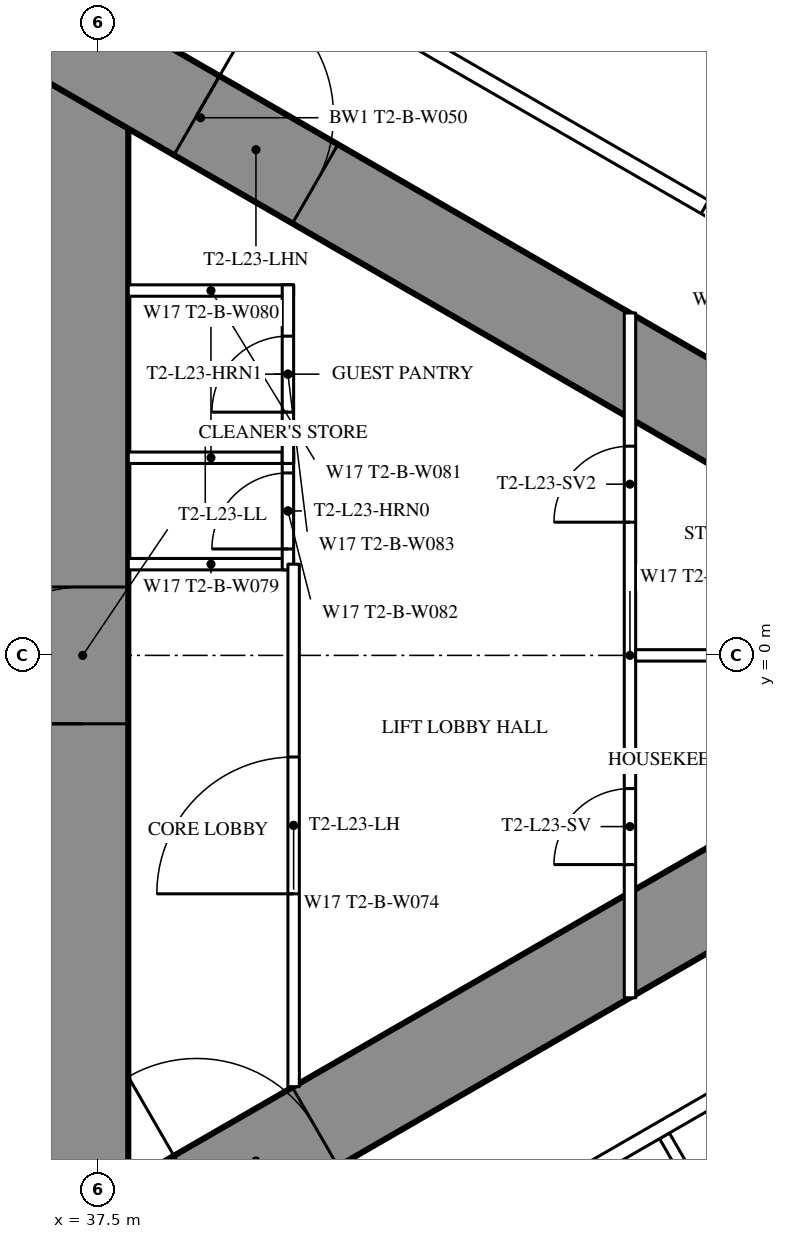
"""IFC4 building model, lengths in metres.
Left out: names, types, materials, properties, quantities, classifications, styles, units other than length and angle.
Written with IfcOpenShell. Run it as: python <this file> out.ifc"""

import sys

from ifc_helpers import new_model, si_unit, direction, frame, frame_2d, origin, place, context, subcontext, project, spatial, rectangle, extrude, element, fill, save


model = new_model("IFC4")
c1 = context("Model", 3, precision=1e-05, world=origin(), true_north=direction((0.0, 1.0)))
c2 = subcontext(c1, "Body", "Model", "MODEL_VIEW")
j1 = project(units=[si_unit("LENGTHUNIT", "METRE"), si_unit("PLANEANGLEUNIT", "RADIAN")], contexts=[c1])
p1 = place(None, origin())
s1 = spatial("IfcSite", under=j1, at=p1, CompositionType="ELEMENT")
p2 = place(p1, origin())
s2 = spatial("IfcBuilding", under=s1, at=p2, CompositionType="ELEMENT")
p3 = place(p2, frame((0.0, 0.0, 90.6)))
s3 = spatial("IfcBuildingStorey", under=s2, at=p3, CompositionType="ELEMENT", Elevation=90.6)
p4 = place(p3, frame((37.3, -8.6, 0.0), z_axis=(0.0, 0.0, 1.0), x_axis=(0.0, 1.0, 0.0)))
e1 = element("IfcWall", 1, at=p4, inside=s3, PredefinedType="SHEAR", context=c2, shape_type="SweptSolid", body=[
    extrude(rectangle(XDim=17.2, YDim=1.2, at=frame_2d((8.6, 0.0))), origin(), (0.0, 0.0, 1.0), 3.5),
])
p5 = place(p4, frame((7.7, 0.0, 0.0)))
e2 = element("IfcOpeningElement", 2, at=p5, cuts=e1, PredefinedType="OPENING", context=c2, shape_type="SweptSolid", body=[
    extrude(rectangle(XDim=1.8, YDim=2.2, at=frame_2d((0.9, 1.1))), frame((0.0, 0.61, 0.0), z_axis=(0.0, -1.0, 0.0), x_axis=(1.0, 0.0, 0.0)), (0.0, 0.0, 1.0), 1.22),
])
p6 = place(p3, frame((27.2, -13.8, 0.0), z_axis=(0.0, 0.0, 1.0), x_axis=(0.866027159892, 0.499996958321, 0.0)))
e3 = element("IfcWall", 3, at=p6, inside=s3, PredefinedType="SHEAR", context=c2, shape_type="SweptSolid", body=[
    extrude(rectangle(XDim=27.947, YDim=1.2, at=frame_2d((13.973, 0.0))), origin(), (0.0, 0.0, 1.0), 3.5),
])
p7 = place(p6, frame((4.6, 0.0, 0.0)))
e4 = element("IfcOpeningElement", 4, at=p7, cuts=e3, PredefinedType="OPENING", context=c2, shape_type="SweptSolid", body=[
    extrude(rectangle(XDim=1.0, YDim=2.2, at=frame_2d((0.5, 1.1))), frame((0.0, 0.61, 0.0), z_axis=(0.0, -1.0, 0.0), x_axis=(1.0, 0.0, 0.0)), (0.0, 0.0, 1.0), 1.22),
])
p8 = place(p6, frame((13.395, 0.0, 0.0)))
e5 = element("IfcOpeningElement", 5, at=p8, cuts=e3, PredefinedType="OPENING", context=c2, shape_type="SweptSolid", body=[
    extrude(rectangle(XDim=1.8, YDim=2.2, at=frame_2d((0.9, 1.1))), frame((0.0, 0.61, 0.0), z_axis=(0.0, -1.0, 0.0), x_axis=(1.0, 0.0, 0.0)), (0.0, 0.0, 1.0), 1.22),
])
p9 = place(p3, frame((27.2, 13.8, 0.0), z_axis=(0.0, 0.0, 1.0), x_axis=(0.866024515034, -0.500001539357, 0.0)))
e6 = element("IfcWall", 6, at=p9, inside=s3, PredefinedType="SHEAR", context=c2, shape_type="SweptSolid", body=[
    extrude(rectangle(XDim=26.907, YDim=1.2, at=frame_2d((13.454, 0.0))), origin(), (0.0, 0.0, 1.0), 3.5),
])
p10 = place(p9, frame((4.6, 0.0, 0.0)))
e7 = element("IfcOpeningElement", 7, at=p10, cuts=e6, PredefinedType="OPENING", context=c2, shape_type="SweptSolid", body=[
    extrude(rectangle(XDim=1.0, YDim=2.2, at=frame_2d((0.5, 1.1))), frame((0.0, 0.61, 0.0), z_axis=(0.0, -1.0, 0.0), x_axis=(1.0, 0.0, 0.0)), (0.0, 0.0, 1.0), 1.22),
])
p11 = place(p9, frame((13.395, 0.0, 0.0)))
e8 = element("IfcOpeningElement", 8, at=p11, cuts=e6, PredefinedType="OPENING", context=c2, shape_type="SweptSolid", body=[
    extrude(rectangle(XDim=1.8, YDim=2.2, at=frame_2d((0.9, 1.1))), frame((0.0, 0.61, 0.0), z_axis=(0.0, -1.0, 0.0), x_axis=(1.0, 0.0, 0.0)), (0.0, 0.0, 1.0), 1.22),
])
p12 = place(p3, frame((44.954, -6.321, 0.0), z_axis=(0.0, 0.0, 1.0), x_axis=(0.500018676722, -0.866014620505, 0.0)))
e9 = element("IfcWall", 9, at=p12, inside=s3, PredefinedType="PARTITIONING", context=c2, shape_type="SweptSolid", body=[
    extrude(rectangle(XDim=8.704, YDim=0.15, at=frame_2d((4.352, 0.0))), origin(), (0.0, 0.0, 1.0), 2.2),
])
p13 = place(p3, frame((37.96, -10.243, 0.0), z_axis=(0.0, 0.0, 1.0), x_axis=(0.866026429433, 0.499998223521, 0.0)))
e10 = element("IfcWall", 10, at=p13, inside=s3, PredefinedType="PARTITIONING", context=c2, shape_type="SweptSolid", body=[
    extrude(rectangle(XDim=20.487, YDim=0.2, at=frame_2d((10.243, 0.0))), origin(), (0.0, 0.0, 1.0), 3.25),
])
p14 = place(p13, frame((4.047, 0.0, 0.0)))
e11 = element("IfcOpeningElement", 11, at=p14, cuts=e10, PredefinedType="OPENING", context=c2, shape_type="SweptSolid", body=[
    extrude(rectangle(XDim=0.95, YDim=2.2, at=frame_2d((0.475, 1.1))), frame((0.0, 0.11, 0.0), z_axis=(0.0, -1.0, 0.0), x_axis=(1.0, 0.0, 0.0)), (0.0, 0.0, 1.0), 0.22),
])
p15 = place(p13, frame((11.04, 0.0, 0.0)))
e12 = element("IfcOpeningElement", 12, at=p15, cuts=e10, PredefinedType="OPENING", context=c2, shape_type="SweptSolid", body=[
    extrude(rectangle(XDim=0.95, YDim=2.2, at=frame_2d((0.475, 1.1))), frame((0.0, 0.11, 0.0), z_axis=(0.0, -1.0, 0.0), x_axis=(1.0, 0.0, 0.0)), (0.0, 0.0, 1.0), 0.22),
])
p16 = place(p13, frame((13.035, 0.0, 0.0)))
e13 = element("IfcOpeningElement", 13, at=p16, cuts=e10, PredefinedType="OPENING", context=c2, shape_type="SweptSolid", body=[
    extrude(rectangle(XDim=0.95, YDim=2.2, at=frame_2d((0.475, 1.1))), frame((0.0, 0.11, 0.0), z_axis=(0.0, -1.0, 0.0), x_axis=(1.0, 0.0, 0.0)), (0.0, 0.0, 1.0), 0.22),
])
p17 = place(p13, frame((17.085, 0.0, 0.0)))
e14 = element("IfcOpeningElement", 14, at=p17, cuts=e10, PredefinedType="OPENING", context=c2, shape_type="SweptSolid", body=[
    extrude(rectangle(XDim=0.95, YDim=2.2, at=frame_2d((0.475, 1.1))), frame((0.0, 0.11, 0.0), z_axis=(0.0, -1.0, 0.0), x_axis=(1.0, 0.0, 0.0)), (0.0, 0.0, 1.0), 0.22),
])
p18 = place(p13, frame((1.048, 0.0, 0.0)))
e15 = element("IfcOpeningElement", 15, at=p18, cuts=e10, PredefinedType="OPENING", context=c2, shape_type="SweptSolid", body=[
    extrude(rectangle(XDim=1.8, YDim=2.2, at=frame_2d((0.9, 1.1))), frame((0.0, 0.11, 0.0), z_axis=(0.0, -1.0, 0.0), x_axis=(1.0, 0.0, 0.0)), (0.0, 0.0, 1.0), 0.22),
])
p19 = place(p3, frame((36.834, 10.894, 0.0), z_axis=(0.0, 0.0, 1.0), x_axis=(0.866028157229, -0.499995230863, 0.0)))
e16 = element("IfcWall", 16, at=p19, inside=s3, PredefinedType="PARTITIONING", context=c2, shape_type="SweptSolid", body=[
    extrude(rectangle(XDim=21.667, YDim=0.2, at=frame_2d((10.833, 0.0))), origin(), (0.0, 0.0, 1.0), 3.25),
])
p20 = place(p19, frame((14.04, 0.0, 0.0)))
e17 = element("IfcOpeningElement", 17, at=p20, cuts=e16, PredefinedType="OPENING", context=c2, shape_type="SweptSolid", body=[
    extrude(rectangle(XDim=0.95, YDim=2.2, at=frame_2d((0.475, 1.1))), frame((0.0, 0.11, 0.0), z_axis=(0.0, -1.0, 0.0), x_axis=(1.0, 0.0, 0.0)), (0.0, 0.0, 1.0), 0.22),
])
p21 = place(p19, frame((9.99, 0.0, 0.0)))
e18 = element("IfcOpeningElement", 18, at=p21, cuts=e16, PredefinedType="OPENING", context=c2, shape_type="SweptSolid", body=[
    extrude(rectangle(XDim=0.95, YDim=2.2, at=frame_2d((0.475, 1.1))), frame((0.0, 0.11, 0.0), z_axis=(0.0, -1.0, 0.0), x_axis=(1.0, 0.0, 0.0)), (0.0, 0.0, 1.0), 0.22),
])
p22 = place(p19, frame((3.35, 0.0, 0.0)))
e19 = element("IfcOpeningElement", 19, at=p22, cuts=e16, PredefinedType="OPENING", context=c2, shape_type="SweptSolid", body=[
    extrude(rectangle(XDim=1.0, YDim=2.2, at=frame_2d((0.5, 1.1))), frame((0.0, 0.11, 0.0), z_axis=(0.0, -1.0, 0.0), x_axis=(1.0, 0.0, 0.0)), (0.0, 0.0, 1.0), 0.22),
])
for number, where, z_axis, x_axis in (
    (20, (37.9, 1.2, 0.0), (0.0, 0.0, 1.0), (1.0, 0.0, 0.0)),
    (21, (37.9, 2.6, 0.0), (0.0, 0.0, 1.0), (1.0, 0.0, 0.0)),
    (22, (37.9, 4.8, 0.0), (0.0, 0.0, 1.0), (1.0, 0.0, 0.0)),
):
    element("IfcWall", number, at=place(p3, frame(where, z_axis=z_axis, x_axis=x_axis)), inside=s3, PredefinedType="PARTITIONING", context=c2, shape_type="SweptSolid", body=[
        extrude(rectangle(XDim=2.175, YDim=0.15, at=frame_2d((1.087, 0.0))), origin(), (0.0, 0.0, 1.0), 3.25),
    ])
p23 = place(p3, frame((40.0, 1.125, 0.0), z_axis=(0.0, 0.0, 1.0), x_axis=(0.0, 1.0, 0.0)))
e23 = element("IfcWall", 23, at=p23, inside=s3, PredefinedType="PARTITIONING", context=c2, shape_type="SweptSolid", body=[
    extrude(rectangle(XDim=1.55, YDim=0.15, at=frame_2d((0.775, 0.0))), origin(), (0.0, 0.0, 1.0), 3.25),
])
p24 = place(p23, frame((0.275, 0.0, 0.0)))
e24 = element("IfcOpeningElement", 24, at=p24, cuts=e23, PredefinedType="OPENING", context=c2, shape_type="SweptSolid", body=[
    extrude(rectangle(XDim=1.0, YDim=2.2, at=frame_2d((0.5, 1.1))), frame((0.0, 0.085, 0.0), z_axis=(0.0, -1.0, 0.0), x_axis=(1.0, 0.0, 0.0)), (0.0, 0.0, 1.0), 0.17),
])
p25 = place(p3, frame((40.0, 2.525, 0.0), z_axis=(0.0, 0.0, 1.0), x_axis=(0.0, 1.0, 0.0)))
e25 = element("IfcWall", 25, at=p25, inside=s3, PredefinedType="PARTITIONING", context=c2, shape_type="SweptSolid", body=[
    extrude(rectangle(XDim=2.35, YDim=0.15, at=frame_2d((1.175, 0.0))), origin(), (0.0, 0.0, 1.0), 3.25),
])
p26 = place(p25, frame((0.675, 0.0, 0.0)))
e26 = element("IfcOpeningElement", 26, at=p26, cuts=e25, PredefinedType="OPENING", context=c2, shape_type="SweptSolid", body=[
    extrude(rectangle(XDim=1.0, YDim=2.2, at=frame_2d((0.5, 1.1))), frame((0.0, 0.085, 0.0), z_axis=(0.0, -1.0, 0.0), x_axis=(1.0, 0.0, 0.0)), (0.0, 0.0, 1.0), 0.17),
])
p27 = place(p3, frame((40.075, -5.674, 0.0), z_axis=(0.0, 0.0, 1.0), x_axis=(0.0, 1.0, 0.0)))
e27 = element("IfcWall", 27, at=p27, inside=s3, PredefinedType="PARTITIONING", context=c2, shape_type="SweptSolid", body=[
    extrude(rectangle(XDim=6.874, YDim=0.15, at=frame_2d((3.437, 0.0))), origin(), (0.0, 0.0, 1.0), 3.25),
])
p28 = place(p27, frame((2.537, 0.0, 0.0)))
e28 = element("IfcOpeningElement", 28, at=p28, cuts=e27, PredefinedType="OPENING", context=c2, shape_type="SweptSolid", body=[
    extrude(rectangle(XDim=1.8, YDim=2.2, at=frame_2d((0.9, 1.1))), frame((0.0, 0.085, 0.0), z_axis=(0.0, -1.0, 0.0), x_axis=(1.0, 0.0, 0.0)), (0.0, 0.0, 1.0), 0.17),
])
p29 = place(p3, frame((44.5, -4.505, 0.0), z_axis=(0.0, 0.0, 1.0), x_axis=(0.0, 1.0, 0.0)))
e29 = element("IfcWall", 29, at=p29, inside=s3, PredefinedType="PARTITIONING", context=c2, shape_type="SweptSolid", body=[
    extrude(rectangle(XDim=9.009, YDim=0.15, at=frame_2d((4.505, 0.0))), origin(), (0.0, 0.0, 1.0), 2.45),
])
p30 = place(p29, frame((1.752, 0.0, 0.0)))
e30 = element("IfcOpeningElement", 30, at=p30, cuts=e29, PredefinedType="OPENING", context=c2, shape_type="SweptSolid", body=[
    extrude(rectangle(XDim=1.0, YDim=2.2, at=frame_2d((0.5, 1.1))), frame((0.0, 0.085, 0.0), z_axis=(0.0, -1.0, 0.0), x_axis=(1.0, 0.0, 0.0)), (0.0, 0.0, 1.0), 0.17),
])
p31 = place(p29, frame((6.257, 0.0, 0.0)))
e31 = element("IfcOpeningElement", 31, at=p31, cuts=e29, PredefinedType="OPENING", context=c2, shape_type="SweptSolid", body=[
    extrude(rectangle(XDim=1.0, YDim=2.2, at=frame_2d((0.5, 1.1))), frame((0.0, 0.085, 0.0), z_axis=(0.0, -1.0, 0.0), x_axis=(1.0, 0.0, 0.0)), (0.0, 0.0, 1.0), 0.17),
])
p32 = place(p3, frame((44.575, 0.0, 0.0), z_axis=(0.0, 0.0, 1.0), x_axis=(1.0, 0.0, 0.0)))
e32 = element("IfcWall", 32, at=p32, inside=s3, PredefinedType="PARTITIONING", context=c2, shape_type="SweptSolid", body=[
    extrude(rectangle(XDim=7.727, YDim=0.15, at=frame_2d((3.864, 0.0))), origin(), (0.0, 0.0, 1.0), 2.2),
])
p33 = place(p21, origin())
e33 = element("IfcDoor", 33, at=p33, inside=s3, OperationType="SINGLE_SWING_LEFT", PredefinedType="DOOR", context=c2, shape_type="SweptSolid", body=[
    extrude(rectangle(XDim=0.95, YDim=2.2, at=frame_2d((0.475, 1.1))), frame((0.0, 0.025, 0.0), z_axis=(0.0, -1.0, 0.0), x_axis=(1.0, 0.0, 0.0)), (0.0, 0.0, 1.0), 0.05),
])
fill(e18, e33)
p34 = place(p24, origin())
e34 = element("IfcDoor", 34, at=p34, inside=s3, OperationType="SINGLE_SWING_LEFT", PredefinedType="DOOR", context=c2, shape_type="SweptSolid", body=[
    extrude(rectangle(XDim=1.0, YDim=2.2, at=frame_2d((0.5, 1.1))), frame((0.0, 0.025, 0.0), z_axis=(0.0, -1.0, 0.0), x_axis=(1.0, 0.0, 0.0)), (0.0, 0.0, 1.0), 0.05),
])
fill(e24, e34)
p35 = place(p26, origin())
e35 = element("IfcDoor", 35, at=p35, inside=s3, OperationType="SINGLE_SWING_LEFT", PredefinedType="DOOR", context=c2, shape_type="SweptSolid", body=[
    extrude(rectangle(XDim=1.0, YDim=2.2, at=frame_2d((0.5, 1.1))), frame((0.0, 0.025, 0.0), z_axis=(0.0, -1.0, 0.0), x_axis=(1.0, 0.0, 0.0)), (0.0, 0.0, 1.0), 0.05),
])
fill(e26, e35)
p36 = place(p28, origin())
e36 = element("IfcDoor", 36, at=p36, inside=s3, OperationType="DOUBLE_DOOR_SINGLE_SWING", PredefinedType="DOOR", context=c2, shape_type="SweptSolid", body=[
    extrude(rectangle(XDim=1.8, YDim=2.2, at=frame_2d((0.9, 1.1))), frame((0.0, 0.025, 0.0), z_axis=(0.0, -1.0, 0.0), x_axis=(1.0, 0.0, 0.0)), (0.0, 0.0, 1.0), 0.05),
])
fill(e28, e36)
p37 = place(p30, origin())
e37 = element("IfcDoor", 37, at=p37, inside=s3, OperationType="SINGLE_SWING_LEFT", PredefinedType="DOOR", context=c2, shape_type="SweptSolid", body=[
    extrude(rectangle(XDim=1.0, YDim=2.2, at=frame_2d((0.5, 1.1))), frame((0.0, 0.025, 0.0), z_axis=(0.0, -1.0, 0.0), x_axis=(1.0, 0.0, 0.0)), (0.0, 0.0, 1.0), 0.05),
])
fill(e30, e37)
p38 = place(p31, origin())
e38 = element("IfcDoor", 38, at=p38, inside=s3, OperationType="SINGLE_SWING_LEFT", PredefinedType="DOOR", context=c2, shape_type="SweptSolid", body=[
    extrude(rectangle(XDim=1.0, YDim=2.2, at=frame_2d((0.5, 1.1))), frame((0.0, 0.025, 0.0), z_axis=(0.0, -1.0, 0.0), x_axis=(1.0, 0.0, 0.0)), (0.0, 0.0, 1.0), 0.05),
])
fill(e31, e38)
p39 = place(p8, origin())
e39 = element("IfcDoor", 39, at=p39, inside=s3, OperationType="DOUBLE_DOOR_SINGLE_SWING", PredefinedType="DOOR", context=c2, shape_type="SweptSolid", body=[
    extrude(rectangle(XDim=1.8, YDim=2.2, at=frame_2d((0.9, 1.1))), frame((0.0, 0.025, 0.0), z_axis=(0.0, -1.0, 0.0), x_axis=(1.0, 0.0, 0.0)), (0.0, 0.0, 1.0), 0.05),
])
fill(e5, e39)
p40 = place(p11, origin())
e40 = element("IfcDoor", 40, at=p40, inside=s3, OperationType="DOUBLE_DOOR_SINGLE_SWING", PredefinedType="DOOR", context=c2, shape_type="SweptSolid", body=[
    extrude(rectangle(XDim=1.8, YDim=2.2, at=frame_2d((0.9, 1.1))), frame((0.0, 0.025, 0.0), z_axis=(0.0, -1.0, 0.0), x_axis=(1.0, 0.0, 0.0)), (0.0, 0.0, 1.0), 0.05),
])
fill(e8, e40)
p41 = place(p5, origin())
e41 = element("IfcDoor", 41, at=p41, inside=s3, OperationType="DOUBLE_DOOR_SINGLE_SWING", PredefinedType="DOOR", context=c2, shape_type="SweptSolid", body=[
    extrude(rectangle(XDim=1.8, YDim=2.2, at=frame_2d((0.9, 1.1))), frame((0.0, 0.025, 0.0), z_axis=(0.0, -1.0, 0.0), x_axis=(1.0, 0.0, 0.0)), (0.0, 0.0, 1.0), 0.05),
])
fill(e2, e41)
save(model, sys.argv[1])
